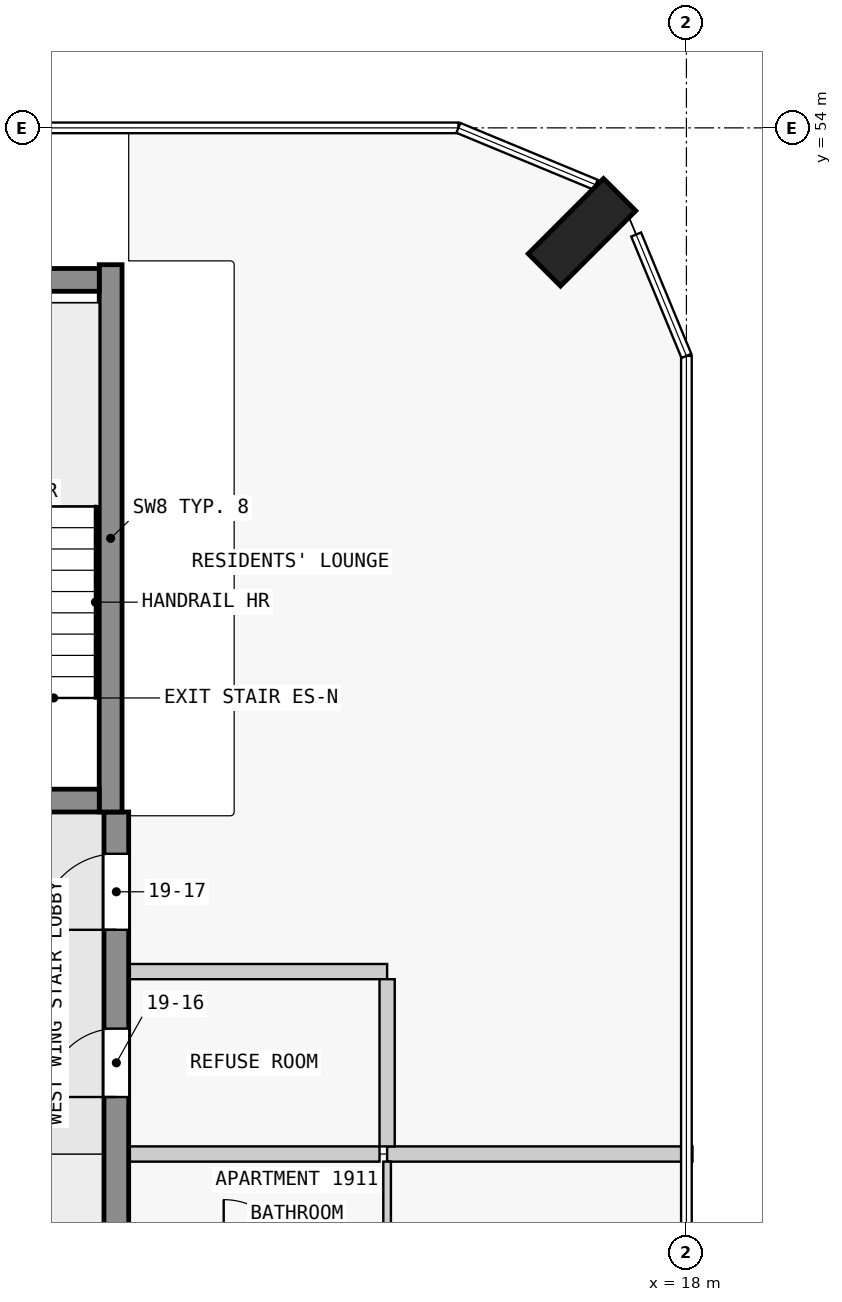
"""IFC4 building model, lengths in metres.
Left out: names, types, materials, properties, quantities, classifications, styles, units other than length and angle.
Written with IfcOpenShell. Run it as: python <this file> out.ifc"""

import sys

from ifc_helpers import new_model, si_unit, direction, frame, frame_2d, origin, origin_2d, place, context, subcontext, project, spatial, rectangle, extrude, element, fill, save


model = new_model("IFC4")
c1 = context("Model", 3, precision=1e-05, world=origin(), true_north=direction((0.0, 1.0)))
c2 = subcontext(c1, "Body", "Model", "MODEL_VIEW")
j1 = project(units=[si_unit("LENGTHUNIT", "METRE"), si_unit("PLANEANGLEUNIT", "RADIAN")], contexts=[c1])
p1 = place(None, origin())
s1 = spatial("IfcSite", under=j1, at=p1, CompositionType="ELEMENT")
p2 = place(p1, origin())
s2 = spatial("IfcBuilding", under=s1, at=p2, CompositionType="ELEMENT")
p3 = place(p2, frame((0.0, 0.0, 78.3)))
s3 = spatial("IfcBuildingStorey", under=s2, at=p3, CompositionType="ELEMENT", Elevation=78.3)
p4 = place(p3, frame((16.626, 52.626, 0.0), z_axis=(0.0, 0.0, 1.0), x_axis=(-0.707106781187, 0.707106781187, 0.0)))
e1 = element("IfcColumn", 1, at=p4, inside=s3, PredefinedType="COLUMN", context=c2, shape_type="SweptSolid", body=[
    extrude(rectangle(XDim=0.6, YDim=1.4, at=origin_2d()), origin(), (0.0, 0.0, 1.0), 3.5),
])
p5 = place(p3, frame((7.725, 45.15, 0.0), z_axis=(0.0, 0.0, 1.0), x_axis=(1.0, 0.0, 0.0)))
e2 = element("IfcWall", 2, at=p5, inside=s3, PredefinedType="SHEAR", context=c2, shape_type="SweptSolid", body=[
    extrude(rectangle(XDim=2.55, YDim=0.3, at=frame_2d((1.275, 0.0))), origin(), (0.0, 0.0, 1.0), 3.5),
])
p6 = place(p5, frame((0.725, 0.0, 0.0)))
e3 = element("IfcOpeningElement", 3, at=p6, cuts=e2, PredefinedType="OPENING", context=c2, shape_type="SweptSolid", body=[
    extrude(rectangle(XDim=1.1, YDim=2.1, at=frame_2d((0.55, 1.05))), frame((0.0, 0.16, 0.0), z_axis=(0.0, -1.0, 0.0), x_axis=(1.0, 0.0, 0.0)), (0.0, 0.0, 1.0), 0.32),
])
p7 = place(p3, frame((7.725, 52.0, 0.0), z_axis=(0.0, 0.0, 1.0), x_axis=(1.0, 0.0, 0.0)))
e4 = element("IfcWall", 4, at=p7, inside=s3, PredefinedType="SHEAR", context=c2, shape_type="SweptSolid", body=[
    extrude(rectangle(XDim=2.55, YDim=0.3, at=frame_2d((1.275, 0.0))), origin(), (0.0, 0.0, 1.0), 3.5),
])
p8 = place(p3, frame((10.425, 45.0, 0.0), z_axis=(0.0, 0.0, 1.0), x_axis=(0.0, 1.0, 0.0)))
e5 = element("IfcWall", 5, at=p8, inside=s3, PredefinedType="SHEAR", context=c2, shape_type="SweptSolid", body=[
    extrude(rectangle(XDim=7.2, YDim=0.3, at=frame_2d((3.6, 0.0))), origin(), (0.0, 0.0, 1.0), 3.5),
])
p9 = place(p3, frame((10.5, 18.0, 0.0), z_axis=(0.0, 0.0, 1.0), x_axis=(0.0, 1.0, 0.0)))
e6 = element("IfcWall", 6, at=p9, inside=s3, PredefinedType="SHEAR", context=c2, shape_type="SweptSolid", body=[
    extrude(rectangle(XDim=27.0, YDim=0.325, at=frame_2d((13.5, 0.0))), origin(), (0.0, 0.0, 1.0), 3.25),
])
p10 = place(p9, frame((4.05, 0.0, 0.0)))
e7 = element("IfcOpeningElement", 7, at=p10, cuts=e6, PredefinedType="OPENING", context=c2, shape_type="SweptSolid", body=[
    extrude(rectangle(XDim=1.0, YDim=2.1, at=frame_2d((0.5, 1.05))), frame((0.0, 0.172, 0.0), z_axis=(0.0, -1.0, 0.0), x_axis=(1.0, 0.0, 0.0)), (0.0, 0.0, 1.0), 0.345),
])
p11 = place(p9, frame((13.05, 0.0, 0.0)))
e8 = element("IfcOpeningElement", 8, at=p11, cuts=e6, PredefinedType="OPENING", context=c2, shape_type="SweptSolid", body=[
    extrude(rectangle(XDim=1.0, YDim=2.1, at=frame_2d((0.5, 1.05))), frame((0.0, 0.172, 0.0), z_axis=(0.0, -1.0, 0.0), x_axis=(1.0, 0.0, 0.0)), (0.0, 0.0, 1.0), 0.345),
])
p12 = place(p9, frame((19.75, 0.0, 0.0)))
e9 = element("IfcOpeningElement", 9, at=p12, cuts=e6, PredefinedType="OPENING", context=c2, shape_type="SweptSolid", body=[
    extrude(rectangle(XDim=1.0, YDim=2.1, at=frame_2d((0.5, 1.05))), frame((0.0, 0.172, 0.0), z_axis=(0.0, -1.0, 0.0), x_axis=(1.0, 0.0, 0.0)), (0.0, 0.0, 1.0), 0.345),
])
p13 = place(p9, frame((23.25, 0.0, 0.0)))
e10 = element("IfcOpeningElement", 10, at=p13, cuts=e6, PredefinedType="OPENING", context=c2, shape_type="SweptSolid", body=[
    extrude(rectangle(XDim=0.9, YDim=2.1, at=frame_2d((0.45, 1.05))), frame((0.0, 0.172, 0.0), z_axis=(0.0, -1.0, 0.0), x_axis=(1.0, 0.0, 0.0)), (0.0, 0.0, 1.0), 0.345),
])
p14 = place(p9, frame((25.45, 0.0, 0.0)))
e11 = element("IfcOpeningElement", 11, at=p14, cuts=e6, PredefinedType="OPENING", context=c2, shape_type="SweptSolid", body=[
    extrude(rectangle(XDim=1.0, YDim=2.1, at=frame_2d((0.5, 1.05))), frame((0.0, 0.172, 0.0), z_axis=(0.0, -1.0, 0.0), x_axis=(1.0, 0.0, 0.0)), (0.0, 0.0, 1.0), 0.345),
])
p15 = place(p3, frame((13.962, 40.5, 0.0), z_axis=(0.0, 0.0, 1.0), x_axis=(-1.0, 0.0, 0.0)))
e12 = element("IfcWall", 12, at=p15, inside=s3, PredefinedType="PARTITIONING", context=c2, shape_type="SweptSolid", body=[
    extrude(rectangle(XDim=3.3, YDim=0.2, at=frame_2d((1.65, 0.0))), origin(), (0.0, 0.0, 1.0), 3.25),
])
p16 = place(p3, frame((14.062, 40.5, 0.0), z_axis=(0.0, 0.0, 1.0), x_axis=(1.0, 0.0, 0.0)))
e13 = element("IfcWall", 13, at=p16, inside=s3, PredefinedType="PARTITIONING", context=c2, shape_type="SweptSolid", body=[
    extrude(rectangle(XDim=4.018, YDim=0.2, at=frame_2d((2.009, 0.0))), origin(), (0.0, 0.0, 1.0), 3.25),
])
p17 = place(p3, frame((14.062, 42.9, 0.0), z_axis=(0.0, 0.0, 1.0), x_axis=(-1.0, 0.0, 0.0)))
e14 = element("IfcWall", 14, at=p17, inside=s3, PredefinedType="PARTITIONING", context=c2, shape_type="SweptSolid", body=[
    extrude(rectangle(XDim=3.4, YDim=0.2, at=frame_2d((1.7, 0.0))), origin(), (0.0, 0.0, 1.0), 3.25),
])
p18 = place(p3, frame((14.062, 39.05, 0.0), z_axis=(0.0, 0.0, 1.0), x_axis=(0.0, 1.0, 0.0)))
e15 = element("IfcWall", 15, at=p18, inside=s3, PredefinedType="PARTITIONING", context=c2, shape_type="SweptSolid", body=[
    extrude(rectangle(XDim=1.35, YDim=0.1, at=frame_2d((0.675, 0.0))), origin(), (0.0, 0.0, 1.0), 3.25),
])
p19 = place(p3, frame((14.062, 40.6, 0.0), z_axis=(0.0, 0.0, 1.0), x_axis=(0.0, 1.0, 0.0)))
e16 = element("IfcWall", 16, at=p19, inside=s3, PredefinedType="PARTITIONING", context=c2, shape_type="SweptSolid", body=[
    extrude(rectangle(XDim=2.2, YDim=0.2, at=frame_2d((1.1, 0.0))), origin(), (0.0, 0.0, 1.0), 3.25),
])
p20 = place(p13, origin())
e17 = element("IfcDoor", 17, at=p20, inside=s3, OperationType="SINGLE_SWING_RIGHT", PredefinedType="DOOR", context=c2, shape_type="SweptSolid", body=[
    extrude(rectangle(XDim=0.9, YDim=2.1, at=frame_2d((0.45, 1.05))), frame((0.0, 0.025, 0.0), z_axis=(0.0, -1.0, 0.0), x_axis=(1.0, 0.0, 0.0)), (0.0, 0.0, 1.0), 0.05),
])
fill(e10, e17)
p21 = place(p14, origin())
e18 = element("IfcDoor", 18, at=p21, inside=s3, OperationType="SINGLE_SWING_RIGHT", PredefinedType="DOOR", context=c2, shape_type="SweptSolid", body=[
    extrude(rectangle(XDim=1.0, YDim=2.1, at=frame_2d((0.5, 1.05))), frame((0.0, 0.025, 0.0), z_axis=(0.0, -1.0, 0.0), x_axis=(1.0, 0.0, 0.0)), (0.0, 0.0, 1.0), 0.05),
])
fill(e11, e18)
save(model, sys.argv[1])
